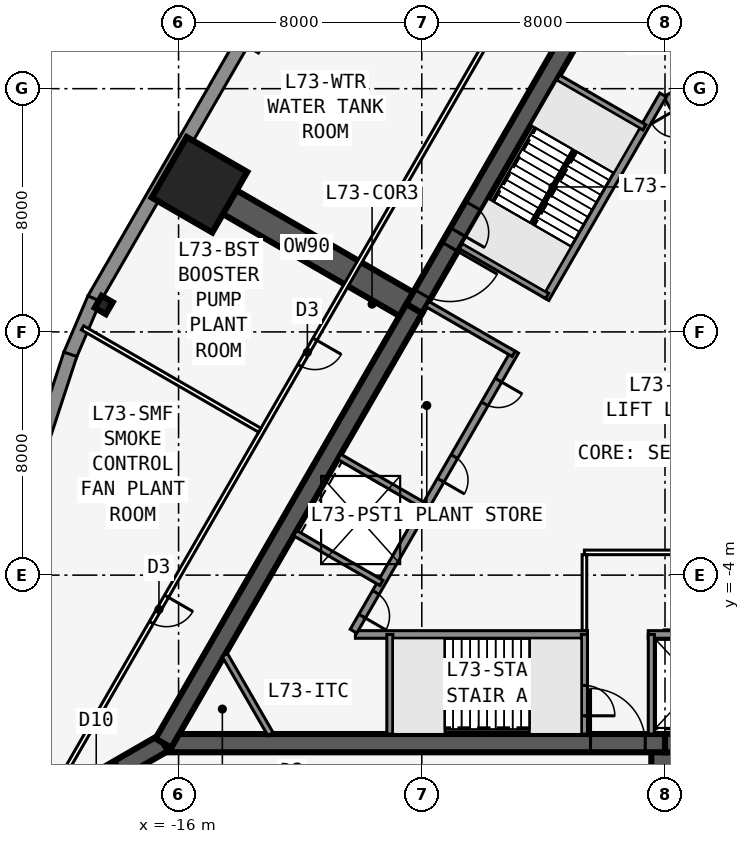
"""IFC4 building model, lengths in metres.
Left out: names, types, materials, properties, quantities, classifications, styles, units other than length and angle.
Written with IfcOpenShell. Run it as: python <this file> out.ifc"""

import sys

from ifc_helpers import new_model, si_unit, direction, frame, frame_2d, origin, origin_2d, place, context, subcontext, project, spatial, polyline, rectangle, i_section, outline, extrude, element, fill, save


model = new_model("IFC4")
c1 = context("Model", 3, precision=1e-05, world=origin(), true_north=direction((0.0, 1.0)))
c2 = subcontext(c1, "Body", "Model", "MODEL_VIEW")
j1 = project(units=[si_unit("LENGTHUNIT", "METRE"), si_unit("PLANEANGLEUNIT", "RADIAN")], contexts=[c1])
p1 = place(None, origin())
s1 = spatial("IfcSite", under=j1, at=p1, CompositionType="ELEMENT")
p2 = place(p1, origin())
s2 = spatial("IfcBuilding", under=s1, at=p2, CompositionType="ELEMENT")
p3 = place(p2, frame((0.0, 0.0, 275.3)))
s3 = spatial("IfcBuildingStorey", under=s2, at=p3, CompositionType="ELEMENT", Elevation=275.3)
p4 = place(p3, frame((-16.5, -9.526, 0.0), z_axis=(0.0, 0.0, 1.0), x_axis=(1.0, 0.0, 0.0)))
e1 = element("IfcWall", 1, at=p4, inside=s3, PredefinedType="SHEAR", context=c2, shape_type="SweptSolid", body=[
    extrude(rectangle(XDim=16.5, YDim=0.6, at=frame_2d((8.25, 0.0))), origin(), (0.0, 0.0, 1.0), 6.0),
])
p5 = place(p4, frame((14.05, 0.0, 0.0)))
e2 = element("IfcOpeningElement", 2, at=p5, cuts=e1, PredefinedType="OPENING", context=c2, shape_type="SweptSolid", body=[
    extrude(rectangle(XDim=1.8, YDim=2.13, at=frame_2d((0.9, 1.065))), frame((0.0, 0.31, 0.0), z_axis=(0.0, -1.0, 0.0), x_axis=(1.0, 0.0, 0.0)), (0.0, 0.0, 1.0), 0.62),
])
p6 = place(p3, frame((0.0, -9.526, 0.0), z_axis=(0.0, 0.0, 1.0), x_axis=(1.0, 0.0, 0.0)))
e3 = element("IfcWall", 3, at=p6, inside=s3, PredefinedType="SHEAR", context=c2, shape_type="SweptSolid", body=[
    extrude(rectangle(XDim=16.5, YDim=0.6, at=frame_2d((8.25, 0.0))), origin(), (0.0, 0.0, 1.0), 6.0),
])
p7 = place(p3, frame((-10.183, -5.951, 0.0), z_axis=(0.0, 0.0, 1.0), x_axis=(1.0, 0.0, 0.0)))
e4 = element("IfcWall", 4, at=p7, inside=s3, PredefinedType="SOLIDWALL", context=c2, shape_type="SweptSolid", body=[
    extrude(rectangle(XDim=7.633, YDim=0.25, at=frame_2d((3.816, 0.0))), origin(), (0.0, 0.0, 1.0), 5.75),
])
p8 = place(p3, frame((-0.55, -5.951, 0.0), z_axis=(0.0, 0.0, 1.0), x_axis=(1.0, 0.0, 0.0)))
e5 = element("IfcWall", 5, at=p8, inside=s3, PredefinedType="SOLIDWALL", context=c2, shape_type="SweptSolid", body=[
    extrude(rectangle(XDim=10.733, YDim=0.25, at=frame_2d((5.366, 0.0))), origin(), (0.0, 0.0, 1.0), 5.75),
])
p9 = place(p8, frame((9.314, 0.0, 0.0)))
e6 = element("IfcOpeningElement", 6, at=p9, cuts=e5, PredefinedType="OPENING", context=c2, shape_type="SweptSolid", body=[
    extrude(rectangle(XDim=0.9, YDim=2.13, at=frame_2d((0.45, 1.065))), frame((0.0, 0.135, 0.0), z_axis=(0.0, -1.0, 0.0), x_axis=(1.0, 0.0, 0.0)), (0.0, 0.0, 1.0), 0.27),
])
p10 = place(p8, frame((1.05, 0.0, 0.0)))
e7 = element("IfcOpeningElement", 7, at=p10, cuts=e5, PredefinedType="OPENING", context=c2, shape_type="SweptSolid", body=[
    extrude(rectangle(XDim=1.1, YDim=2.13, at=frame_2d((0.55, 1.065))), frame((0.0, 0.135, 0.0), z_axis=(0.0, -1.0, 0.0), x_axis=(1.0, 0.0, 0.0)), (0.0, 0.0, 1.0), 0.27),
])
p11 = place(p8, frame((4.05, 0.0, 0.0)))
e8 = element("IfcOpeningElement", 8, at=p11, cuts=e5, PredefinedType="OPENING", context=c2, shape_type="SweptSolid", body=[
    extrude(rectangle(XDim=1.1, YDim=2.13, at=frame_2d((0.55, 1.065))), frame((0.0, 0.135, 0.0), z_axis=(0.0, -1.0, 0.0), x_axis=(1.0, 0.0, 0.0)), (0.0, 0.0, 1.0), 0.27),
])
p12 = place(p3, frame((-9.05, -5.951, 0.0), z_axis=(0.0, 0.0, 1.0), x_axis=(0.0, -1.0, 0.0)))
e9 = element("IfcWall", 9, at=p12, inside=s3, PredefinedType="SOLIDWALL", context=c2, shape_type="SweptSolid", body=[
    extrude(rectangle(XDim=3.275, YDim=0.2, at=frame_2d((1.637, 0.0))), origin(), (0.0, 0.0, 1.0), 5.75),
])
p13 = place(p3, frame((-2.65, -5.951, 0.0), z_axis=(0.0, 0.0, 1.0), x_axis=(0.0, -1.0, 0.0)))
e10 = element("IfcWall", 10, at=p13, inside=s3, PredefinedType="SOLIDWALL", context=c2, shape_type="SweptSolid", body=[
    extrude(rectangle(XDim=3.275, YDim=0.2, at=frame_2d((1.637, 0.0))), origin(), (0.0, 0.0, 1.0), 5.75),
])
p14 = place(p13, frame((1.675, 0.0, 0.0)))
e11 = element("IfcOpeningElement", 11, at=p14, cuts=e10, PredefinedType="OPENING", context=c2, shape_type="SweptSolid", body=[
    extrude(rectangle(XDim=1.0, YDim=2.13, at=frame_2d((0.5, 1.065))), frame((0.0, 0.11, 0.0), z_axis=(0.0, -1.0, 0.0), x_axis=(1.0, 0.0, 0.0)), (0.0, 0.0, 1.0), 0.22),
])
p15 = place(p3, frame((-0.45, -5.951, 0.0), z_axis=(0.0, 0.0, 1.0), x_axis=(0.0, -1.0, 0.0)))
e12 = element("IfcWall", 12, at=p15, inside=s3, PredefinedType="SOLIDWALL", context=c2, shape_type="SweptSolid", body=[
    extrude(rectangle(XDim=3.275, YDim=0.2, at=frame_2d((1.637, 0.0))), origin(), (0.0, 0.0, 1.0), 5.75),
])
p16 = place(p3, frame((8.25, 4.763, 0.0), z_axis=(0.0, 0.0, 1.0), x_axis=(-0.500002952946, 0.866023698893, 0.0)))
e13 = element("IfcWall", 13, at=p16, inside=s3, PredefinedType="SHEAR", context=c2, shape_type="SweptSolid", body=[
    extrude(rectangle(XDim=16.5, YDim=0.6, at=frame_2d((8.25, 0.0))), origin(), (0.0, 0.0, 1.0), 6.0),
])
p17 = place(p3, frame((5.379, 2.586, 0.0), z_axis=(0.0, 0.0, 1.0), x_axis=(-0.500001375892, 0.866024609411, 0.0)))
e14 = element("IfcWall", 14, at=p17, inside=s3, PredefinedType="SOLIDWALL", context=c2, shape_type="SweptSolid", body=[
    extrude(rectangle(XDim=10.633, YDim=0.25, at=frame_2d((5.316, 0.0))), origin(), (0.0, 0.0, 1.0), 5.75),
])
p18 = place(p17, frame((9.164, 0.0, 0.0)))
e15 = element("IfcOpeningElement", 15, at=p18, cuts=e14, PredefinedType="OPENING", context=c2, shape_type="SweptSolid", body=[
    extrude(rectangle(XDim=0.9, YDim=2.13, at=frame_2d((0.45, 1.065))), frame((0.0, 0.135, 0.0), z_axis=(0.0, -1.0, 0.0), x_axis=(1.0, 0.0, 0.0)), (0.0, 0.0, 1.0), 0.27),
])
p19 = place(p3, frame((0.0, 19.052, 0.0), z_axis=(0.0, 0.0, 1.0), x_axis=(-0.500002952946, -0.866023698893, 0.0)))
e16 = element("IfcWall", 16, at=p19, inside=s3, PredefinedType="SHEAR", context=c2, shape_type="SweptSolid", body=[
    extrude(rectangle(XDim=16.5, YDim=0.6, at=frame_2d((8.25, 0.0))), origin(), (0.0, 0.0, 1.0), 6.0),
])
p20 = place(p19, frame((14.15, 0.0, 0.0)))
e17 = element("IfcOpeningElement", 17, at=p20, cuts=e16, PredefinedType="OPENING", context=c2, shape_type="SweptSolid", body=[
    extrude(rectangle(XDim=1.8, YDim=2.13, at=frame_2d((0.9, 1.065))), frame((0.0, 0.31, 0.0), z_axis=(0.0, -1.0, 0.0), x_axis=(1.0, 0.0, 0.0)), (0.0, 0.0, 1.0), 0.62),
])
p21 = place(p19, frame((12.6, 0.0, 0.0)))
e18 = element("IfcOpeningElement", 18, at=p21, cuts=e16, PredefinedType="OPENING", context=c2, shape_type="SweptSolid", body=[
    extrude(rectangle(XDim=1.0, YDim=2.13, at=frame_2d((0.5, 1.065))), frame((0.0, 0.31, 0.0), z_axis=(0.0, -1.0, 0.0), x_axis=(1.0, 0.0, 0.0)), (0.0, 0.0, 1.0), 0.62),
])
p22 = place(p3, frame((-8.25, 4.763, 0.0), z_axis=(0.0, 0.0, 1.0), x_axis=(-0.499996545922, -0.866027397988, 0.0)))
e19 = element("IfcWall", 19, at=p22, inside=s3, PredefinedType="SHEAR", context=c2, shape_type="SweptSolid", body=[
    extrude(rectangle(XDim=16.5, YDim=0.6, at=frame_2d((8.25, 0.0))), origin(), (0.0, 0.0, 1.0), 6.0),
])
p23 = place(p3, frame((-0.062, 11.794, 0.0), z_axis=(0.0, 0.0, 1.0), x_axis=(-0.500006680225, -0.86602154692, 0.0)))
e20 = element("IfcWall", 20, at=p23, inside=s3, PredefinedType="SOLIDWALL", context=c2, shape_type="SweptSolid", body=[
    extrude(rectangle(XDim=7.733, YDim=0.25, at=frame_2d((3.866, 0.0))), origin(), (0.0, 0.0, 1.0), 5.75),
])
p24 = place(p3, frame((-4.929, 3.365, 0.0), z_axis=(0.0, 0.0, 1.0), x_axis=(-0.499991433582, -0.866030349552, 0.0)))
e21 = element("IfcWall", 21, at=p24, inside=s3, PredefinedType="SOLIDWALL", context=c2, shape_type="SweptSolid", body=[
    extrude(rectangle(XDim=10.633, YDim=0.25, at=frame_2d((5.316, 0.0))), origin(), (0.0, 0.0, 1.0), 5.75),
])
p25 = place(p24, frame((9.164, 0.0, 0.0)))
e22 = element("IfcOpeningElement", 22, at=p25, cuts=e21, PredefinedType="OPENING", context=c2, shape_type="SweptSolid", body=[
    extrude(rectangle(XDim=0.9, YDim=2.13, at=frame_2d((0.45, 1.065))), frame((0.0, 0.135, 0.0), z_axis=(0.0, -1.0, 0.0), x_axis=(1.0, 0.0, 0.0)), (0.0, 0.0, 1.0), 0.27),
])
p26 = place(p24, frame((1.1, 0.0, 0.0)))
e23 = element("IfcOpeningElement", 23, at=p26, cuts=e21, PredefinedType="OPENING", context=c2, shape_type="SweptSolid", body=[
    extrude(rectangle(XDim=0.9, YDim=2.13, at=frame_2d((0.45, 1.065))), frame((0.0, 0.135, 0.0), z_axis=(0.0, -1.0, 0.0), x_axis=(1.0, 0.0, 0.0)), (0.0, 0.0, 1.0), 0.27),
])
p27 = place(p24, frame((4.0, 0.0, 0.0)))
e24 = element("IfcOpeningElement", 24, at=p27, cuts=e21, PredefinedType="OPENING", context=c2, shape_type="SweptSolid", body=[
    extrude(rectangle(XDim=0.9, YDim=2.13, at=frame_2d((0.45, 1.065))), frame((0.0, 0.135, 0.0), z_axis=(0.0, -1.0, 0.0), x_axis=(1.0, 0.0, 0.0)), (0.0, 0.0, 1.0), 0.27),
])
for number, where, z_axis, x_axis in (
    (25, (-0.679, 10.727, 0.0), (0.0, 0.0, 1.0), (-0.866, 0.5, 0.0)),
    (26, (-3.879, 5.184, 0.0), (0.0, 0.0, 1.0), (-0.866, 0.5, 0.0)),
    (27, (-4.979, 3.279, 0.0), (0.0, 0.0, 1.0), (-0.866, 0.5, 0.0)),
    (28, (-7.879, -1.744, 0.0), (0.0, 0.0, 1.0), (-0.866, 0.5, 0.0)),
    (29, (-9.329, -4.256, 0.0), (0.0, 0.0, 1.0), (-0.866, 0.5, 0.0)),
):
    element("IfcWall", number, at=place(p3, frame(where, z_axis=z_axis, x_axis=x_axis)), inside=s3, PredefinedType="SOLIDWALL", context=c2, shape_type="SweptSolid", body=[
        extrude(rectangle(XDim=3.275, YDim=0.2, at=frame_2d((1.637, 0.0))), origin(), (0.0, 0.0, 1.0), 5.75),
    ])
p28 = place(p3, frame((-16.5, -9.526, 0.0), z_axis=(0.0, 0.0, 1.0), x_axis=(-0.866031398331, -0.499989616998, 0.0)))
e30 = element("IfcWall", 30, at=p28, inside=s3, PredefinedType="SHEAR", context=c2, shape_type="SweptSolid", body=[
    extrude(rectangle(XDim=4.746, YDim=0.6, at=frame_2d((2.373, 0.0))), origin(), (0.0, 0.0, 1.0), 6.0),
])
p29 = place(p28, frame((1.65, 0.0, 0.0)))
e31 = element("IfcOpeningElement", 31, at=p29, cuts=e30, PredefinedType="OPENING", context=c2, shape_type="SweptSolid", body=[
    extrude(rectangle(XDim=1.8, YDim=2.13, at=frame_2d((0.9, 1.065))), frame((0.0, 0.31, 0.0), z_axis=(0.0, -1.0, 0.0), x_axis=(1.0, 0.0, 0.0)), (0.0, 0.0, 1.0), 0.62),
])
p30 = place(p3, frame((0.0, -9.526, 0.0), z_axis=(0.0, 0.0, 1.0), x_axis=(0.0, -1.0, 0.0)))
e32 = element("IfcWall", 32, at=p30, inside=s3, PredefinedType="SHEAR", context=c2, shape_type="SweptSolid", body=[
    extrude(rectangle(XDim=8.154, YDim=0.9, at=frame_2d((4.077, 0.0))), origin(), (0.0, 0.0, 1.0), 6.0),
])
p31 = place(p3, frame((-8.25, 4.763, 0.0), z_axis=(0.0, 0.0, 1.0), x_axis=(-0.866023543838, 0.500003221507, 0.0)))
e33 = element("IfcWall", 33, at=p31, inside=s3, PredefinedType="SHEAR", context=c2, shape_type="SweptSolid", body=[
    extrude(rectangle(XDim=8.154, YDim=0.9, at=frame_2d((4.077, 0.0))), origin(), (0.0, 0.0, 1.0), 6.0),
])
p32 = place(p3, frame((-18.461, 4.885, 0.0), z_axis=(0.0, 0.0, 1.0), x_axis=(-0.866025403784, 0.5, 0.0)))
e34 = element("IfcColumn", 34, at=p32, inside=s3, PredefinedType="COLUMN", context=c2, shape_type="SweptSolid", body=[
    extrude(i_section(OverallWidth=0.419, OverallDepth=0.455, WebThickness=0.042, FlangeThickness=0.068, at=origin_2d()), origin(), (0.0, 0.0, 1.0), 6.0),
])
p33 = place(p3, frame((-15.312, 8.84, 0.0), z_axis=(0.0, 0.0, 1.0), x_axis=(-0.866025403784, 0.5, 0.0)))
e35 = element("IfcColumn", 35, at=p33, inside=s3, PredefinedType="COLUMN", context=c2, shape_type="SweptSolid", body=[
    extrude(rectangle(XDim=2.3, YDim=2.3, at=origin_2d()), origin(), (0.0, 0.0, 1.0), 6.0),
])
p34 = place(p3, frame((-13.786, 13.733, 0.0), z_axis=(0.0, 0.0, 1.0), x_axis=(-0.499993662806, -0.866029062534, 0.0)))
e36 = element("IfcWall", 36, at=p34, inside=s3, PredefinedType="SOLIDWALL", context=c2, shape_type="SweptSolid", body=[
    extrude(outline(polyline([(0.0, 0.0), (10.0, 0.0), (10.0, 5.75), (0.0, 5.75), (0.0, 0.0)]), holes=[polyline([(7.25, 2.875), (7.173, 3.457), (6.948, 4.0), (6.591, 4.466), (6.125, 4.823), (5.583, 5.048), (5.0, 5.125), (4.418, 5.048), (3.875, 4.823), (3.409, 4.466), (3.052, 4.0), (2.827, 3.457), (2.75, 2.875), (2.827, 2.293), (3.052, 1.75), (3.409, 1.284), (3.875, 0.926), (4.418, 0.702), (5.0, 0.625), (5.583, 0.702), (6.125, 0.926), (6.591, 1.284), (6.948, 1.75), (7.173, 2.293), (7.25, 2.875)])]), frame((0.0, 0.225, 0.0), z_axis=(0.0, -1.0, 0.0), x_axis=(1.0, 0.0, 0.0)), (0.0, 0.0, 1.0), 0.45),
])
p35 = place(p3, frame((-18.774, 5.097, 0.0), z_axis=(0.0, 0.0, 1.0), x_axis=(-0.393290226175, -0.91941437774, 0.0)))
e37 = element("IfcWall", 37, at=p35, inside=s3, PredefinedType="SOLIDWALL", context=c2, shape_type="SweptSolid", body=[
    extrude(rectangle(XDim=2.014, YDim=0.45, at=frame_2d((1.007, 0.0))), origin(), (0.0, 0.0, 1.0), 5.75),
])
p36 = place(p3, frame((-19.559, 3.263, 0.0), z_axis=(0.0, 0.0, 1.0), x_axis=(-0.311328857048, -0.95030223759, 0.0)))
e38 = element("IfcWall", 38, at=p36, inside=s3, PredefinedType="SOLIDWALL", context=c2, shape_type="SweptSolid", body=[
    extrude(outline(polyline([(0.0, 0.0), (7.153, 0.0), (7.153, 5.75), (0.0, 5.75), (0.0, 0.0)]), holes=[polyline([(5.826, 2.875), (5.75, 3.457), (5.525, 4.0), (5.167, 4.466), (4.701, 4.823), (4.159, 5.048), (3.576, 5.125), (2.994, 5.048), (2.451, 4.823), (1.985, 4.466), (1.628, 4.0), (1.403, 3.457), (1.326, 2.875), (1.403, 2.293), (1.628, 1.75), (1.985, 1.284), (2.451, 0.926), (2.994, 0.702), (3.576, 0.625), (4.159, 0.702), (4.701, 0.926), (5.167, 1.284), (5.525, 1.75), (5.75, 2.293), (5.826, 2.875)])]), frame((0.0, 0.225, 0.0), z_axis=(0.0, -1.0, 0.0), x_axis=(1.0, 0.0, 0.0)), (0.0, 0.0, 1.0), 0.45),
])
p37 = place(p3, frame((-0.35, 23.096, 0.0), z_axis=(0.0, 0.0, 1.0), x_axis=(-0.499998875317, -0.866026053119, 0.0)))
e39 = element("IfcWall", 39, at=p37, inside=s3, PredefinedType="PARTITIONING", context=c2, shape_type="SweptSolid", body=[
    extrude(rectangle(XDim=39.654, YDim=0.15, at=frame_2d((19.827, 0.0))), origin(), (0.0, 0.0, 1.0), 5.75),
])
p38 = place(p37, frame((9.563, 0.0, 0.0)))
e40 = element("IfcOpeningElement", 40, at=p38, cuts=e39, PredefinedType="OPENING", context=c2, shape_type="SweptSolid", body=[
    extrude(rectangle(XDim=1.0, YDim=2.13, at=frame_2d((0.5, 1.065))), frame((0.0, 0.085, 0.0), z_axis=(0.0, -1.0, 0.0), x_axis=(1.0, 0.0, 0.0)), (0.0, 0.0, 1.0), 0.17),
])
p39 = place(p37, frame((22.327, 0.0, 0.0)))
e41 = element("IfcOpeningElement", 41, at=p39, cuts=e39, PredefinedType="OPENING", context=c2, shape_type="SweptSolid", body=[
    extrude(rectangle(XDim=1.0, YDim=2.13, at=frame_2d((0.5, 1.065))), frame((0.0, 0.085, 0.0), z_axis=(0.0, -1.0, 0.0), x_axis=(1.0, 0.0, 0.0)), (0.0, 0.0, 1.0), 0.17),
])
p40 = place(p37, frame((32.091, 0.0, 0.0)))
e42 = element("IfcOpeningElement", 42, at=p40, cuts=e39, PredefinedType="OPENING", context=c2, shape_type="SweptSolid", body=[
    extrude(rectangle(XDim=1.0, YDim=2.13, at=frame_2d((0.5, 1.065))), frame((0.0, 0.085, 0.0), z_axis=(0.0, -1.0, 0.0), x_axis=(1.0, 0.0, 0.0)), (0.0, 0.0, 1.0), 0.17),
])
p41 = place(p3, frame((-13.329, 0.767, 0.0), z_axis=(0.0, 0.0, 1.0), x_axis=(-0.866020720842, 0.500008111007, 0.0)))
e43 = element("IfcWall", 43, at=p41, inside=s3, PredefinedType="PARTITIONING", context=c2, shape_type="SweptSolid", body=[
    extrude(rectangle(XDim=6.732, YDim=0.15, at=frame_2d((3.366, 0.0))), origin(), (0.0, 0.0, 1.0), 5.75),
])
p42 = place(p3, frame((-2.65, -3.251, 0.0), z_axis=(0.0, 0.0, 1.0), x_axis=(1.0, 0.0, 0.0)))
e44 = element("IfcWall", 44, at=p42, inside=s3, PredefinedType="PARTITIONING", context=c2, shape_type="SweptSolid", body=[
    extrude(rectangle(XDim=8.35, YDim=0.15, at=frame_2d((4.175, 0.0))), origin(), (0.0, 0.0, 1.0), 5.75),
])
p43 = place(p3, frame((-2.65, -5.826, 0.0), z_axis=(0.0, 0.0, 1.0), x_axis=(0.0, 1.0, 0.0)))
e45 = element("IfcWall", 45, at=p43, inside=s3, PredefinedType="PARTITIONING", context=c2, shape_type="SweptSolid", body=[
    extrude(rectangle(XDim=2.5, YDim=0.15, at=frame_2d((1.25, 0.0))), origin(), (0.0, 0.0, 1.0), 5.75),
])
p44 = place(p3, frame((-12.978, -9.226, 0.0), z_axis=(0.0, 0.0, 1.0), x_axis=(-0.499952404951, 0.866052881055, 0.0)))
e46 = element("IfcWall", 46, at=p44, inside=s3, PredefinedType="SOLIDWALL", context=c2, shape_type="SweptSolid", body=[
    extrude(rectangle(XDim=3.002, YDim=0.2, at=frame_2d((1.501, 0.0))), origin(), (0.0, 0.0, 1.0), 5.75),
])
p45 = place(p3, frame((-7.247, -7.576, 0.0), z_axis=(0.0, 0.0, 1.0), x_axis=(1.0, 0.0, 0.0)))
e47 = element("IfcWall", 47, at=p45, inside=s3, PredefinedType="SOLIDWALL", context=c2, shape_type="SweptSolid", body=[
    extrude(rectangle(XDim=2.794, YDim=0.1, at=frame_2d((1.397, 0.0))), origin(), (0.0, 0.0, 1.0), 6.0),
])
p46 = place(p3, frame((-2.988, 9.978, 0.0), z_axis=(0.0, 0.0, 1.0), x_axis=(-0.499992232847, -0.866029888106, 0.0)))
e48 = element("IfcWall", 48, at=p46, inside=s3, PredefinedType="SOLIDWALL", context=c2, shape_type="SweptSolid", body=[
    extrude(rectangle(XDim=2.794, YDim=0.1, at=frame_2d((1.397, 0.0))), origin(), (0.0, 0.0, 1.0), 6.0),
])
p47 = place(p39, origin())
e49 = element("IfcDoor", 49, at=p47, inside=s3, OperationType="SINGLE_SWING_LEFT", PredefinedType="DOOR", context=c2, shape_type="SweptSolid", body=[
    extrude(rectangle(XDim=1.0, YDim=2.13, at=frame_2d((0.5, 1.065))), frame((0.0, 0.025, 0.0), z_axis=(0.0, -1.0, 0.0), x_axis=(1.0, 0.0, 0.0)), (0.0, 0.0, 1.0), 0.05),
])
fill(e41, e49)
p48 = place(p40, origin())
e50 = element("IfcDoor", 50, at=p48, inside=s3, OperationType="SINGLE_SWING_LEFT", PredefinedType="DOOR", context=c2, shape_type="SweptSolid", body=[
    extrude(rectangle(XDim=1.0, YDim=2.13, at=frame_2d((0.5, 1.065))), frame((0.0, 0.025, 0.0), z_axis=(0.0, -1.0, 0.0), x_axis=(1.0, 0.0, 0.0)), (0.0, 0.0, 1.0), 0.05),
])
fill(e42, e50)
p49 = place(p5, origin())
e51 = element("IfcDoor", 51, at=p49, inside=s3, OperationType="DOUBLE_DOOR_SINGLE_SWING", PredefinedType="DOOR", context=c2, shape_type="SweptSolid", body=[
    extrude(rectangle(XDim=1.8, YDim=2.13, at=frame_2d((0.9, 1.065))), frame((0.0, 0.025, 0.0), z_axis=(0.0, -1.0, 0.0), x_axis=(1.0, 0.0, 0.0)), (0.0, 0.0, 1.0), 0.05),
])
fill(e2, e51)
p50 = place(p14, origin())
e52 = element("IfcDoor", 52, at=p50, inside=s3, OperationType="SINGLE_SWING_RIGHT", PredefinedType="DOOR", context=c2, shape_type="SweptSolid", body=[
    extrude(rectangle(XDim=1.0, YDim=2.13, at=frame_2d((0.5, 1.065))), frame((0.0, 0.025, 0.0), z_axis=(0.0, -1.0, 0.0), x_axis=(1.0, 0.0, 0.0)), (0.0, 0.0, 1.0), 0.05),
])
fill(e11, e52)
p51 = place(p20, origin())
e53 = element("IfcDoor", 53, at=p51, inside=s3, OperationType="DOUBLE_DOOR_SINGLE_SWING", PredefinedType="DOOR", context=c2, shape_type="SweptSolid", body=[
    extrude(rectangle(XDim=1.8, YDim=2.13, at=frame_2d((0.9, 1.065))), frame((0.0, 0.025, 0.0), z_axis=(0.0, -1.0, 0.0), x_axis=(1.0, 0.0, 0.0)), (0.0, 0.0, 1.0), 0.05),
])
fill(e17, e53)
p52 = place(p21, origin())
e54 = element("IfcDoor", 54, at=p52, inside=s3, OperationType="SINGLE_SWING_RIGHT", PredefinedType="DOOR", context=c2, shape_type="SweptSolid", body=[
    extrude(rectangle(XDim=1.0, YDim=2.13, at=frame_2d((0.5, 1.065))), frame((0.0, 0.025, 0.0), z_axis=(0.0, -1.0, 0.0), x_axis=(1.0, 0.0, 0.0)), (0.0, 0.0, 1.0), 0.05),
])
fill(e18, e54)
p53 = place(p25, origin())
e55 = element("IfcDoor", 55, at=p53, inside=s3, OperationType="SINGLE_SWING_RIGHT", PredefinedType="DOOR", context=c2, shape_type="SweptSolid", body=[
    extrude(rectangle(XDim=0.9, YDim=2.13, at=frame_2d((0.45, 1.065))), frame((0.0, 0.025, 0.0), z_axis=(0.0, -1.0, 0.0), x_axis=(1.0, 0.0, 0.0)), (0.0, 0.0, 1.0), 0.05),
])
fill(e22, e55)
p54 = place(p26, origin())
e56 = element("IfcDoor", 56, at=p54, inside=s3, OperationType="SINGLE_SWING_LEFT", PredefinedType="DOOR", context=c2, shape_type="SweptSolid", body=[
    extrude(rectangle(XDim=0.9, YDim=2.13, at=frame_2d((0.45, 1.065))), frame((0.0, 0.025, 0.0), z_axis=(0.0, -1.0, 0.0), x_axis=(1.0, 0.0, 0.0)), (0.0, 0.0, 1.0), 0.05),
])
fill(e23, e56)
p55 = place(p27, origin())
e57 = element("IfcDoor", 57, at=p55, inside=s3, OperationType="SINGLE_SWING_RIGHT", PredefinedType="DOOR", context=c2, shape_type="SweptSolid", body=[
    extrude(rectangle(XDim=0.9, YDim=2.13, at=frame_2d((0.45, 1.065))), frame((0.0, 0.025, 0.0), z_axis=(0.0, -1.0, 0.0), x_axis=(1.0, 0.0, 0.0)), (0.0, 0.0, 1.0), 0.05),
])
fill(e24, e57)
save(model, sys.argv[1])
